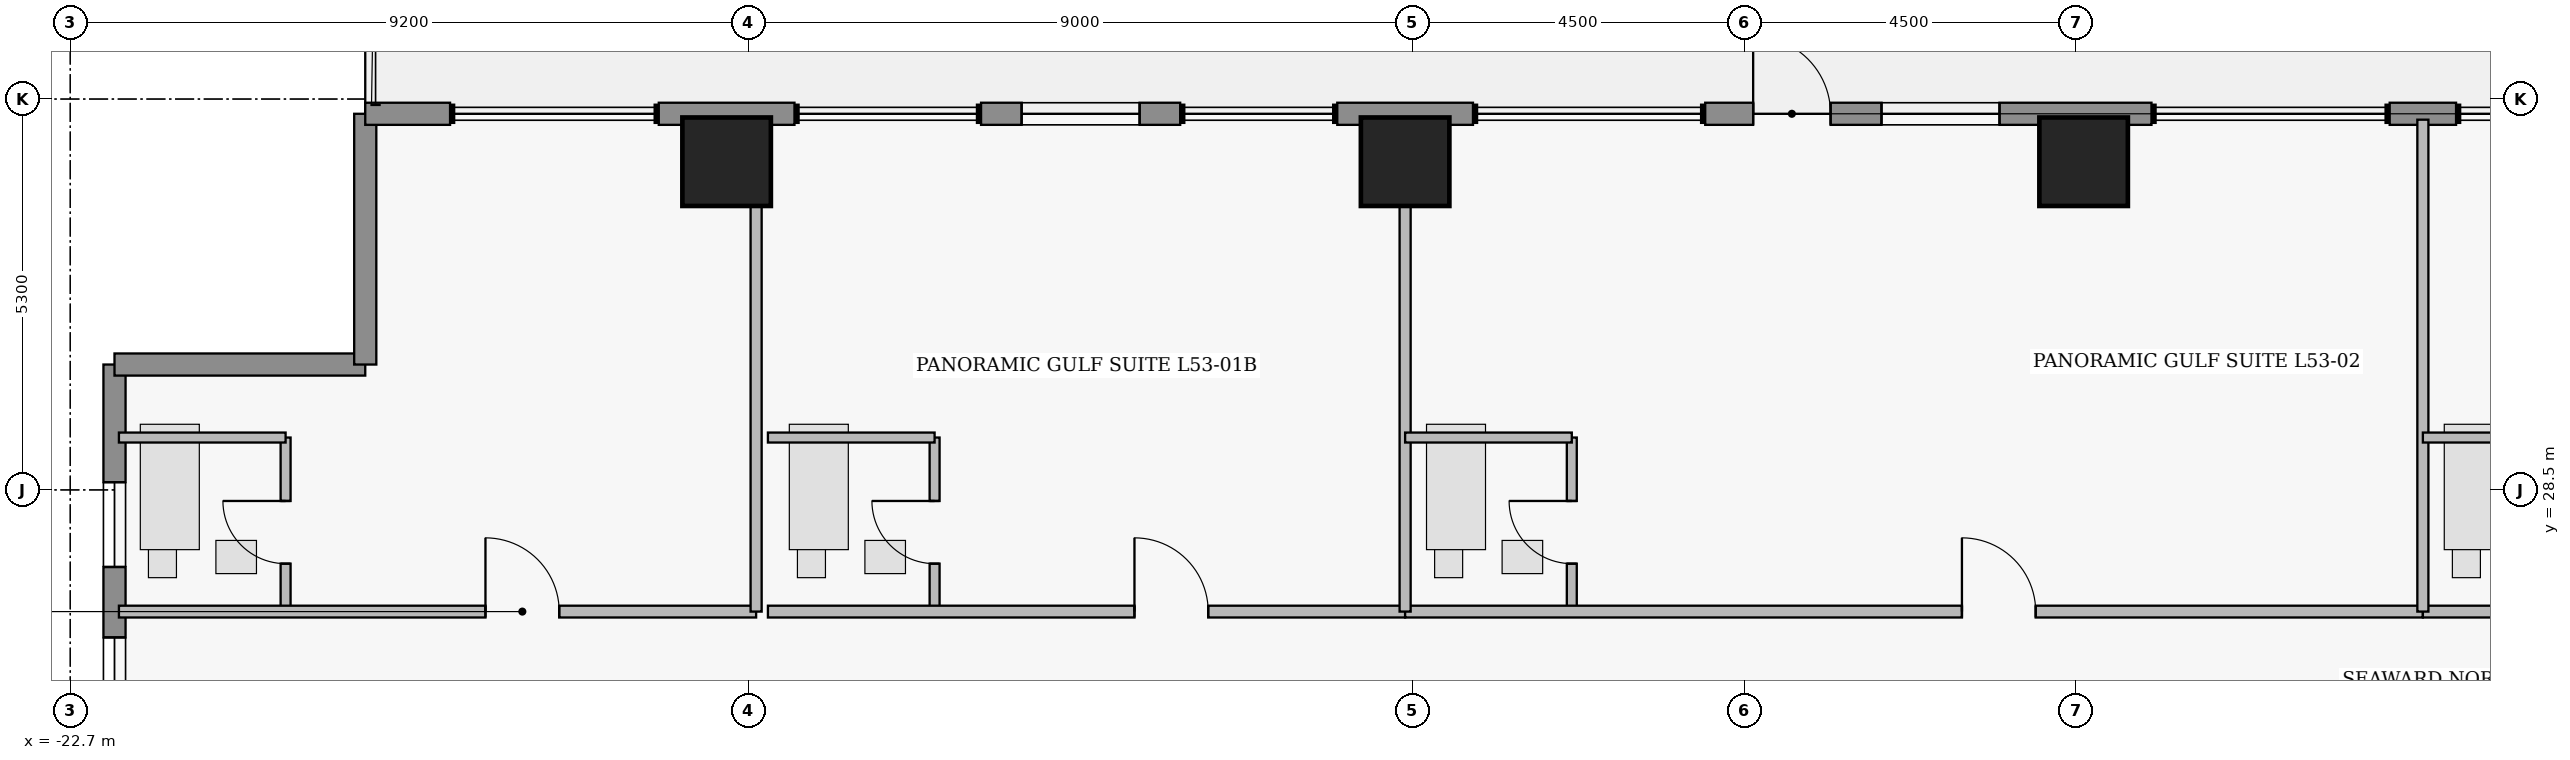
"""IFC4 building model, lengths in metres.
Left out: names, types, materials, properties, quantities, classifications, styles, units other than length and angle.
Written with IfcOpenShell. Run it as: python <this file> out.ifc"""

import sys

from ifc_helpers import new_model, si_unit, direction, frame, frame_2d, origin, origin_2d, place, context, subcontext, project, spatial, rectangle, extrude, element, fill, save


model = new_model("IFC4")
c1 = context("Model", 3, precision=1e-05, world=origin(), true_north=direction((0.0, 1.0)))
c2 = subcontext(c1, "Body", "Model", "MODEL_VIEW")
j1 = project(units=[si_unit("LENGTHUNIT", "METRE"), si_unit("PLANEANGLEUNIT", "RADIAN")], contexts=[c1])
p1 = place(None, origin())
s1 = spatial("IfcSite", under=j1, at=p1, CompositionType="ELEMENT")
p2 = place(p1, origin())
s2 = spatial("IfcBuilding", under=s1, at=p2, CompositionType="ELEMENT")
p3 = place(p2, frame((0.0, 0.0, 211.15)))
s3 = spatial("IfcBuildingStorey", under=s2, at=p3, CompositionType="ELEMENT", Elevation=211.15)
for number, where, z_axis, x_axis in (
    (1, (-13.8, 32.95, 0.0), (0.0, 0.0, 1.0), (1.0, 0.0, 0.0)),
    (2, (-4.6, 32.95, 0.0), (0.0, 0.0, 1.0), (1.0, 0.0, 0.0)),
    (3, (4.6, 32.95, 0.0), (0.0, 0.0, 1.0), (1.0, 0.0, 0.0)),
):
    element("IfcColumn", number, at=place(p3, frame(where, z_axis=z_axis, x_axis=x_axis)), inside=s3, PredefinedType="COLUMN", context=c2, shape_type="SweptSolid", body=[
        extrude(rectangle(XDim=1.2, YDim=1.2, at=origin_2d()), origin(), (0.0, 0.0, 1.0), 3.75),
    ])
p4 = place(p3, frame((-22.1, 24.55, 0.0), z_axis=(0.0, 0.0, 1.0), x_axis=(0.0, 1.0, 0.0)))
e4 = element("IfcWall", 4, at=p4, inside=s3, PredefinedType="STANDARD", context=c2, shape_type="SweptSolid", body=[
    extrude(rectangle(XDim=5.65, YDim=0.3, at=frame_2d((2.825, 0.0))), origin(), (0.0, 0.0, 1.0), 3.53),
])
p5 = place(p4, frame((0.8, 0.0, 0.95)))
e5 = element("IfcOpeningElement", 5, at=p5, cuts=e4, PredefinedType="OPENING", context=c2, shape_type="SweptSolid", body=[
    extrude(rectangle(XDim=1.15, YDim=1.55, at=frame_2d((0.575, 0.775))), frame((0.0, 0.16, 0.0), z_axis=(0.0, -1.0, 0.0), x_axis=(1.0, 0.0, 0.0)), (0.0, 0.0, 1.0), 0.32),
])
p6 = place(p4, frame((2.905, 0.0, 0.95)))
e6 = element("IfcOpeningElement", 6, at=p6, cuts=e4, PredefinedType="OPENING", context=c2, shape_type="SweptSolid", body=[
    extrude(rectangle(XDim=1.15, YDim=1.55, at=frame_2d((0.575, 0.775))), frame((0.0, 0.16, 0.0), z_axis=(0.0, -1.0, 0.0), x_axis=(1.0, 0.0, 0.0)), (0.0, 0.0, 1.0), 0.32),
])
for number, where, z_axis, x_axis in (
    (7, (-22.1, 30.2, 0.0), (0.0, 0.0, 1.0), (1.0, 0.0, 0.0)),
    (8, (-18.7, 30.2, 0.0), (0.0, 0.0, 1.0), (0.0, 1.0, 0.0)),
):
    element("IfcWall", number, at=place(p3, frame(where, z_axis=z_axis, x_axis=x_axis)), inside=s3, PredefinedType="STANDARD", context=c2, shape_type="SweptSolid", body=[
        extrude(rectangle(XDim=3.4, YDim=0.3, at=frame_2d((1.7, 0.0))), origin(), (0.0, 0.0, 1.0), 3.53),
    ])
p7 = place(p3, frame((-18.7, 33.6, 0.0), z_axis=(0.0, 0.0, 1.0), x_axis=(1.0, 0.0, 0.0)))
e9 = element("IfcWall", 9, at=p7, inside=s3, PredefinedType="STANDARD", context=c2, shape_type="SweptSolid", body=[
    extrude(rectangle(XDim=1.15, YDim=0.3, at=frame_2d((0.575, 0.0))), origin(), (0.0, 0.0, 1.0), 3.53),
])
p8 = place(p3, frame((-14.72, 33.6, 0.0), z_axis=(0.0, 0.0, 1.0), x_axis=(1.0, 0.0, 0.0)))
e10 = element("IfcWall", 10, at=p8, inside=s3, PredefinedType="STANDARD", context=c2, shape_type="SweptSolid", body=[
    extrude(rectangle(XDim=1.84, YDim=0.3, at=frame_2d((0.92, 0.0))), origin(), (0.0, 0.0, 1.0), 3.53),
])
p9 = place(p3, frame((-10.35, 33.6, 0.0), z_axis=(0.0, 0.0, 1.0), x_axis=(1.0, 0.0, 0.0)))
e11 = element("IfcWall", 11, at=p9, inside=s3, PredefinedType="STANDARD", context=c2, shape_type="SweptSolid", body=[
    extrude(rectangle(XDim=2.7, YDim=0.3, at=frame_2d((1.35, 0.0))), origin(), (0.0, 0.0, 1.0), 3.53),
])
p10 = place(p9, frame((0.55, 0.0, 0.85)))
e12 = element("IfcOpeningElement", 12, at=p10, cuts=e11, PredefinedType="OPENING", context=c2, shape_type="SweptSolid", body=[
    extrude(rectangle(XDim=1.6, YDim=1.8, at=frame_2d((0.8, 0.9))), frame((0.0, 0.16, 0.0), z_axis=(0.0, -1.0, 0.0), x_axis=(1.0, 0.0, 0.0)), (0.0, 0.0, 1.0), 0.32),
])
p11 = place(p3, frame((-5.52, 33.6, 0.0), z_axis=(0.0, 0.0, 1.0), x_axis=(1.0, 0.0, 0.0)))
e13 = element("IfcWall", 13, at=p11, inside=s3, PredefinedType="STANDARD", context=c2, shape_type="SweptSolid", body=[
    extrude(rectangle(XDim=1.84, YDim=0.3, at=frame_2d((0.92, 0.0))), origin(), (0.0, 0.0, 1.0), 3.53),
])
p12 = place(p3, frame((-0.531, 33.6, 0.0), z_axis=(0.0, 0.0, 1.0), x_axis=(1.0, 0.0, 0.0)))
e14 = element("IfcWall", 14, at=p12, inside=s3, PredefinedType="STANDARD", context=c2, shape_type="SweptSolid", body=[
    extrude(rectangle(XDim=6.051, YDim=0.3, at=frame_2d((3.025, 0.0))), origin(), (0.0, 0.0, 1.0), 3.53),
])
p13 = place(p12, frame((0.65, 0.0, 0.0)))
e15 = element("IfcOpeningElement", 15, at=p13, cuts=e14, PredefinedType="OPENING", context=c2, shape_type="SweptSolid", body=[
    extrude(rectangle(XDim=1.05, YDim=2.2, at=frame_2d((0.525, 1.1))), frame((0.0, 0.16, 0.0), z_axis=(0.0, -1.0, 0.0), x_axis=(1.0, 0.0, 0.0)), (0.0, 0.0, 1.0), 0.32),
])
p14 = place(p12, frame((2.39, 0.0, 0.85)))
e16 = element("IfcOpeningElement", 16, at=p14, cuts=e14, PredefinedType="OPENING", context=c2, shape_type="SweptSolid", body=[
    extrude(rectangle(XDim=1.6, YDim=1.8, at=frame_2d((0.8, 0.9))), frame((0.0, 0.16, 0.0), z_axis=(0.0, -1.0, 0.0), x_axis=(1.0, 0.0, 0.0)), (0.0, 0.0, 1.0), 0.32),
])
p15 = place(p3, frame((8.75, 33.6, 0.0), z_axis=(0.0, 0.0, 1.0), x_axis=(1.0, 0.0, 0.0)))
e17 = element("IfcWall", 17, at=p15, inside=s3, PredefinedType="STANDARD", context=c2, shape_type="SweptSolid", body=[
    extrude(rectangle(XDim=0.9, YDim=0.3, at=frame_2d((0.45, 0.0))), origin(), (0.0, 0.0, 1.0), 3.53),
])
p16 = place(p3, frame((-19.78, 26.85, 0.0), z_axis=(0.0, 0.0, 1.0), x_axis=(0.0, 1.0, 0.0)))
e18 = element("IfcWall", 18, at=p16, inside=s3, PredefinedType="PLUMBINGWALL", context=c2, shape_type="SweptSolid", body=[
    extrude(rectangle(XDim=2.36, YDim=0.135, at=frame_2d((1.18, 0.0))), origin(), (0.0, 0.0, 1.0), 3.53),
])
p17 = place(p16, frame((0.65, 0.0, 0.0)))
e19 = element("IfcOpeningElement", 19, at=p17, cuts=e18, PredefinedType="OPENING", context=c2, shape_type="SweptSolid", body=[
    extrude(rectangle(XDim=0.85, YDim=2.1, at=frame_2d((0.425, 1.05))), frame((0.0, 0.077, 0.0), z_axis=(0.0, -1.0, 0.0), x_axis=(1.0, 0.0, 0.0)), (0.0, 0.0, 1.0), 0.155),
])
p18 = place(p3, frame((-22.04, 26.85, 0.0), z_axis=(0.0, 0.0, 1.0), x_axis=(1.0, 0.0, 0.0)))
e20 = element("IfcWall", 20, at=p18, inside=s3, PredefinedType="PARTITIONING", context=c2, shape_type="SweptSolid", body=[
    extrude(rectangle(XDim=8.64, YDim=0.16, at=frame_2d((4.32, 0.0))), origin(), (0.0, 0.0, 1.0), 3.53),
])
p19 = place(p18, frame((4.97, 0.0, 0.0)))
e21 = element("IfcOpeningElement", 21, at=p19, cuts=e20, PredefinedType="OPENING", context=c2, shape_type="SweptSolid", body=[
    extrude(rectangle(XDim=1.0, YDim=2.15, at=frame_2d((0.5, 1.075))), frame((0.0, 0.09, 0.0), z_axis=(0.0, -1.0, 0.0), x_axis=(1.0, 0.0, 0.0)), (0.0, 0.0, 1.0), 0.18),
])
p20 = place(p3, frame((-10.98, 26.85, 0.0), z_axis=(0.0, 0.0, 1.0), x_axis=(0.0, 1.0, 0.0)))
e22 = element("IfcWall", 22, at=p20, inside=s3, PredefinedType="PLUMBINGWALL", context=c2, shape_type="SweptSolid", body=[
    extrude(rectangle(XDim=2.36, YDim=0.135, at=frame_2d((1.18, 0.0))), origin(), (0.0, 0.0, 1.0), 3.53),
])
p21 = place(p20, frame((0.65, 0.0, 0.0)))
e23 = element("IfcOpeningElement", 23, at=p21, cuts=e22, PredefinedType="OPENING", context=c2, shape_type="SweptSolid", body=[
    extrude(rectangle(XDim=0.85, YDim=2.1, at=frame_2d((0.425, 1.05))), frame((0.0, 0.077, 0.0), z_axis=(0.0, -1.0, 0.0), x_axis=(1.0, 0.0, 0.0)), (0.0, 0.0, 1.0), 0.155),
])
p22 = place(p3, frame((-13.24, 26.85, 0.0), z_axis=(0.0, 0.0, 1.0), x_axis=(1.0, 0.0, 0.0)))
e24 = element("IfcWall", 24, at=p22, inside=s3, PredefinedType="PARTITIONING", context=c2, shape_type="SweptSolid", body=[
    extrude(rectangle(XDim=8.64, YDim=0.16, at=frame_2d((4.32, 0.0))), origin(), (0.0, 0.0, 1.0), 3.53),
])
p23 = place(p22, frame((4.97, 0.0, 0.0)))
e25 = element("IfcOpeningElement", 25, at=p23, cuts=e24, PredefinedType="OPENING", context=c2, shape_type="SweptSolid", body=[
    extrude(rectangle(XDim=1.0, YDim=2.15, at=frame_2d((0.5, 1.075))), frame((0.0, 0.09, 0.0), z_axis=(0.0, -1.0, 0.0), x_axis=(1.0, 0.0, 0.0)), (0.0, 0.0, 1.0), 0.18),
])
p24 = place(p3, frame((-2.34, 26.85, 0.0), z_axis=(0.0, 0.0, 1.0), x_axis=(0.0, 1.0, 0.0)))
e26 = element("IfcWall", 26, at=p24, inside=s3, PredefinedType="PLUMBINGWALL", context=c2, shape_type="SweptSolid", body=[
    extrude(rectangle(XDim=2.36, YDim=0.135, at=frame_2d((1.18, 0.0))), origin(), (0.0, 0.0, 1.0), 3.53),
])
p25 = place(p24, frame((0.65, 0.0, 0.0)))
e27 = element("IfcOpeningElement", 27, at=p25, cuts=e26, PredefinedType="OPENING", context=c2, shape_type="SweptSolid", body=[
    extrude(rectangle(XDim=0.85, YDim=2.1, at=frame_2d((0.425, 1.05))), frame((0.0, 0.077, 0.0), z_axis=(0.0, -1.0, 0.0), x_axis=(1.0, 0.0, 0.0)), (0.0, 0.0, 1.0), 0.155),
])
p26 = place(p3, frame((-4.6, 26.85, 0.0), z_axis=(0.0, 0.0, 1.0), x_axis=(1.0, 0.0, 0.0)))
e28 = element("IfcWall", 28, at=p26, inside=s3, PredefinedType="PARTITIONING", context=c2, shape_type="SweptSolid", body=[
    extrude(rectangle(XDim=13.8, YDim=0.16, at=frame_2d((6.9, 0.0))), origin(), (0.0, 0.0, 1.0), 3.53),
])
p27 = place(p26, frame((7.55, 0.0, 0.0)))
e29 = element("IfcOpeningElement", 29, at=p27, cuts=e28, PredefinedType="OPENING", context=c2, shape_type="SweptSolid", body=[
    extrude(rectangle(XDim=1.0, YDim=2.15, at=frame_2d((0.5, 1.075))), frame((0.0, 0.09, 0.0), z_axis=(0.0, -1.0, 0.0), x_axis=(1.0, 0.0, 0.0)), (0.0, 0.0, 1.0), 0.18),
])
p28 = place(p3, frame((9.2, 26.85, 0.0), z_axis=(0.0, 0.0, 1.0), x_axis=(1.0, 0.0, 0.0)))
e30 = element("IfcWall", 30, at=p28, inside=s3, PredefinedType="PARTITIONING", context=c2, shape_type="SweptSolid", body=[
    extrude(rectangle(XDim=12.84, YDim=0.16, at=frame_2d((6.42, 0.0))), origin(), (0.0, 0.0, 1.0), 3.53),
])
p29 = place(p28, frame((7.07, 0.0, 0.0)))
e31 = element("IfcOpeningElement", 31, at=p29, cuts=e30, PredefinedType="OPENING", context=c2, shape_type="SweptSolid", body=[
    extrude(rectangle(XDim=1.0, YDim=2.15, at=frame_2d((0.5, 1.075))), frame((0.0, 0.09, 0.0), z_axis=(0.0, -1.0, 0.0), x_axis=(1.0, 0.0, 0.0)), (0.0, 0.0, 1.0), 0.18),
])
p30 = place(p3, frame((-22.04, 29.21, 0.0), z_axis=(0.0, 0.0, 1.0), x_axis=(1.0, 0.0, 0.0)))
e32 = element("IfcWall", 32, at=p30, inside=s3, PredefinedType="PLUMBINGWALL", context=c2, shape_type="SweptSolid", body=[
    extrude(rectangle(XDim=2.26, YDim=0.135, at=frame_2d((1.13, 0.0))), origin(), (0.0, 0.0, 1.0), 3.53),
])
p31 = place(p3, frame((-13.4, 26.85, 0.0), z_axis=(0.0, 0.0, 1.0), x_axis=(0.0, 1.0, 0.0)))
e33 = element("IfcWall", 33, at=p31, inside=s3, PredefinedType="PARTITIONING", context=c2, shape_type="SweptSolid", body=[
    extrude(rectangle(XDim=6.67, YDim=0.15, at=frame_2d((3.335, 0.0))), origin(), (0.0, 0.0, 1.0), 2.519),
])
p32 = place(p3, frame((-13.24, 29.21, 0.0), z_axis=(0.0, 0.0, 1.0), x_axis=(1.0, 0.0, 0.0)))
e34 = element("IfcWall", 34, at=p32, inside=s3, PredefinedType="PLUMBINGWALL", context=c2, shape_type="SweptSolid", body=[
    extrude(rectangle(XDim=2.26, YDim=0.135, at=frame_2d((1.13, 0.0))), origin(), (0.0, 0.0, 1.0), 3.53),
])
p33 = place(p3, frame((-4.6, 26.85, 0.0), z_axis=(0.0, 0.0, 1.0), x_axis=(0.0, 1.0, 0.0)))
e35 = element("IfcWall", 35, at=p33, inside=s3, PredefinedType="PARTITIONING", context=c2, shape_type="SweptSolid", body=[
    extrude(rectangle(XDim=6.67, YDim=0.15, at=frame_2d((3.335, 0.0))), origin(), (0.0, 0.0, 1.0), 2.519),
])
p34 = place(p3, frame((-4.6, 29.21, 0.0), z_axis=(0.0, 0.0, 1.0), x_axis=(1.0, 0.0, 0.0)))
e36 = element("IfcWall", 36, at=p34, inside=s3, PredefinedType="PLUMBINGWALL", context=c2, shape_type="SweptSolid", body=[
    extrude(rectangle(XDim=2.26, YDim=0.135, at=frame_2d((1.13, 0.0))), origin(), (0.0, 0.0, 1.0), 3.53),
])
p35 = place(p3, frame((9.2, 26.85, 0.0), z_axis=(0.0, 0.0, 1.0), x_axis=(0.0, 1.0, 0.0)))
e37 = element("IfcWall", 37, at=p35, inside=s3, PredefinedType="PARTITIONING", context=c2, shape_type="SweptSolid", body=[
    extrude(rectangle(XDim=6.67, YDim=0.15, at=frame_2d((3.335, 0.0))), origin(), (0.0, 0.0, 1.0), 3.53),
])
p36 = place(p3, frame((9.2, 29.21, 0.0), z_axis=(0.0, 0.0, 1.0), x_axis=(1.0, 0.0, 0.0)))
e38 = element("IfcWall", 38, at=p36, inside=s3, PredefinedType="PLUMBINGWALL", context=c2, shape_type="SweptSolid", body=[
    extrude(rectangle(XDim=2.26, YDim=0.135, at=frame_2d((1.13, 0.0))), origin(), (0.0, 0.0, 1.0), 3.53),
])
p37 = place(p5, origin())
e39 = element("IfcWindow", 39, at=p37, inside=s3, PartitioningType="SINGLE_PANEL", PredefinedType="WINDOW", context=c2, shape_type="SweptSolid", body=[
    extrude(rectangle(XDim=1.15, YDim=1.55, at=frame_2d((0.575, 0.775))), frame((0.0, 0.03, 0.0), z_axis=(0.0, -1.0, 0.0), x_axis=(1.0, 0.0, 0.0)), (0.0, 0.0, 1.0), 0.06),
])
fill(e5, e39)
p38 = place(p6, origin())
e40 = element("IfcWindow", 40, at=p38, inside=s3, PartitioningType="SINGLE_PANEL", PredefinedType="WINDOW", context=c2, shape_type="SweptSolid", body=[
    extrude(rectangle(XDim=1.15, YDim=1.55, at=frame_2d((0.575, 0.775))), frame((0.0, 0.03, 0.0), z_axis=(0.0, -1.0, 0.0), x_axis=(1.0, 0.0, 0.0)), (0.0, 0.0, 1.0), 0.06),
])
fill(e6, e40)
p39 = place(p10, origin())
e41 = element("IfcWindow", 41, at=p39, inside=s3, PartitioningType="SINGLE_PANEL", PredefinedType="WINDOW", context=c2, shape_type="SweptSolid", body=[
    extrude(rectangle(XDim=1.6, YDim=1.8, at=frame_2d((0.8, 0.9))), frame((0.0, 0.03, 0.0), z_axis=(0.0, -1.0, 0.0), x_axis=(1.0, 0.0, 0.0)), (0.0, 0.0, 1.0), 0.06),
])
fill(e12, e41)
p40 = place(p13, origin())
e42 = element("IfcDoor", 42, at=p40, inside=s3, OperationType="SINGLE_SWING_LEFT", PredefinedType="DOOR", context=c2, shape_type="SweptSolid", body=[
    extrude(rectangle(XDim=1.05, YDim=2.2, at=frame_2d((0.525, 1.1))), frame((0.0, 0.025, 0.0), z_axis=(0.0, -1.0, 0.0), x_axis=(1.0, 0.0, 0.0)), (0.0, 0.0, 1.0), 0.05),
])
fill(e15, e42)
p41 = place(p14, origin())
e43 = element("IfcWindow", 43, at=p41, inside=s3, PartitioningType="SINGLE_PANEL", PredefinedType="WINDOW", context=c2, shape_type="SweptSolid", body=[
    extrude(rectangle(XDim=1.6, YDim=1.8, at=frame_2d((0.8, 0.9))), frame((0.0, 0.03, 0.0), z_axis=(0.0, -1.0, 0.0), x_axis=(1.0, 0.0, 0.0)), (0.0, 0.0, 1.0), 0.06),
])
fill(e16, e43)
p42 = place(p17, origin())
e44 = element("IfcDoor", 44, at=p42, inside=s3, OperationType="SINGLE_SWING_RIGHT", PredefinedType="DOOR", context=c2, shape_type="SweptSolid", body=[
    extrude(rectangle(XDim=0.85, YDim=2.1, at=frame_2d((0.425, 1.05))), frame((0.0, 0.025, 0.0), z_axis=(0.0, -1.0, 0.0), x_axis=(1.0, 0.0, 0.0)), (0.0, 0.0, 1.0), 0.05),
])
fill(e19, e44)
p43 = place(p19, origin())
e45 = element("IfcDoor", 45, at=p43, inside=s3, OperationType="SINGLE_SWING_LEFT", PredefinedType="DOOR", context=c2, shape_type="SweptSolid", body=[
    extrude(rectangle(XDim=1.0, YDim=2.15, at=frame_2d((0.5, 1.075))), frame((0.0, 0.025, 0.0), z_axis=(0.0, -1.0, 0.0), x_axis=(1.0, 0.0, 0.0)), (0.0, 0.0, 1.0), 0.05),
])
fill(e21, e45)
p44 = place(p21, origin())
e46 = element("IfcDoor", 46, at=p44, inside=s3, OperationType="SINGLE_SWING_RIGHT", PredefinedType="DOOR", context=c2, shape_type="SweptSolid", body=[
    extrude(rectangle(XDim=0.85, YDim=2.1, at=frame_2d((0.425, 1.05))), frame((0.0, 0.025, 0.0), z_axis=(0.0, -1.0, 0.0), x_axis=(1.0, 0.0, 0.0)), (0.0, 0.0, 1.0), 0.05),
])
fill(e23, e46)
p45 = place(p23, origin())
e47 = element("IfcDoor", 47, at=p45, inside=s3, OperationType="SINGLE_SWING_LEFT", PredefinedType="DOOR", context=c2, shape_type="SweptSolid", body=[
    extrude(rectangle(XDim=1.0, YDim=2.15, at=frame_2d((0.5, 1.075))), frame((0.0, 0.025, 0.0), z_axis=(0.0, -1.0, 0.0), x_axis=(1.0, 0.0, 0.0)), (0.0, 0.0, 1.0), 0.05),
])
fill(e25, e47)
p46 = place(p25, origin())
e48 = element("IfcDoor", 48, at=p46, inside=s3, OperationType="SINGLE_SWING_RIGHT", PredefinedType="DOOR", context=c2, shape_type="SweptSolid", body=[
    extrude(rectangle(XDim=0.85, YDim=2.1, at=frame_2d((0.425, 1.05))), frame((0.0, 0.025, 0.0), z_axis=(0.0, -1.0, 0.0), x_axis=(1.0, 0.0, 0.0)), (0.0, 0.0, 1.0), 0.05),
])
fill(e27, e48)
p47 = place(p27, origin())
e49 = element("IfcDoor", 49, at=p47, inside=s3, OperationType="SINGLE_SWING_LEFT", PredefinedType="DOOR", context=c2, shape_type="SweptSolid", body=[
    extrude(rectangle(XDim=1.0, YDim=2.15, at=frame_2d((0.5, 1.075))), frame((0.0, 0.025, 0.0), z_axis=(0.0, -1.0, 0.0), x_axis=(1.0, 0.0, 0.0)), (0.0, 0.0, 1.0), 0.05),
])
fill(e29, e49)
save(model, sys.argv[1])
